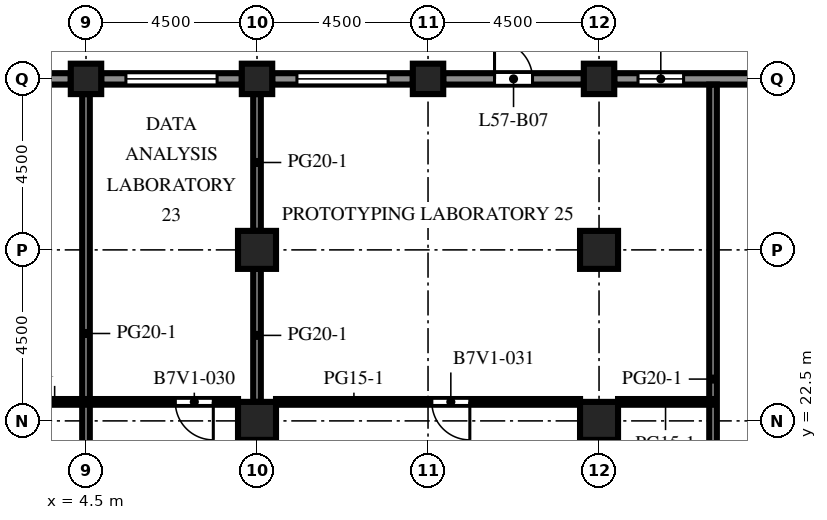
"""IFC4 building model, lengths in metres.
Left out: names, types, materials, properties, quantities, classifications, styles, units other than length and angle.
Written with IfcOpenShell. Run it as: python <this file> out.ifc"""

import sys

from ifc_helpers import new_model, si_unit, direction, frame, frame_2d, origin, origin_2d, place, context, subcontext, project, spatial, rectangle, extrude, element, fill, save


model = new_model("IFC4")
c1 = context("Model", 3, precision=1e-05, world=origin(), true_north=direction((0.0, 1.0)))
c2 = subcontext(c1, "Body", "Model", "MODEL_VIEW")
j1 = project(units=[si_unit("LENGTHUNIT", "METRE"), si_unit("PLANEANGLEUNIT", "RADIAN")], contexts=[c1])
p1 = place(None, origin())
s1 = spatial("IfcSite", under=j1, at=p1, CompositionType="ELEMENT")
p2 = place(p1, origin())
s2 = spatial("IfcBuilding", under=s1, at=p2, CompositionType="ELEMENT")
p3 = place(p2, frame((0.0, 0.0, 252.1)))
s3 = spatial("IfcBuildingStorey", under=s2, at=p3, CompositionType="ELEMENT", Elevation=252.1)
for number, where, z_axis, x_axis in (
    (1, (4.5, 31.5, 0.0), (0.0, 0.0, 1.0), (1.0, 0.0, 0.0)),
    (2, (9.0, 31.5, 0.0), (0.0, 0.0, 1.0), (1.0, 0.0, 0.0)),
    (3, (13.5, 31.5, 0.0), (0.0, 0.0, 1.0), (1.0, 0.0, 0.0)),
    (4, (18.0, 31.5, 0.0), (0.0, 0.0, 1.0), (1.0, 0.0, 0.0)),
):
    element("IfcColumn", number, at=place(p3, frame(where, z_axis=z_axis, x_axis=x_axis)), inside=s3, PredefinedType="COLUMN", context=c2, shape_type="SweptSolid", body=[
        extrude(rectangle(XDim=0.8, YDim=0.8, at=origin_2d()), origin(), (0.0, 0.0, 1.0), 4.1),
    ])
for number, where, z_axis, x_axis in (
    (5, (9.0, 22.5, 0.0), (0.0, 0.0, 1.0), (1.0, 0.0, 0.0)),
    (6, (9.0, 27.0, 0.0), (0.0, 0.0, 1.0), (1.0, 0.0, 0.0)),
    (7, (18.0, 22.5, 0.0), (0.0, 0.0, 1.0), (1.0, 0.0, 0.0)),
    (8, (18.0, 27.0, 0.0), (0.0, 0.0, 1.0), (1.0, 0.0, 0.0)),
):
    element("IfcColumn", number, at=place(p3, frame(where, z_axis=z_axis, x_axis=x_axis)), inside=s3, PredefinedType="COLUMN", context=c2, shape_type="SweptSolid", body=[
        extrude(rectangle(XDim=1.0, YDim=1.0, at=origin_2d()), origin(), (0.0, 0.0, 1.0), 4.1),
    ])
p4 = place(p3, frame((18.4, 31.5, 0.0), z_axis=(0.0, 0.0, 1.0), x_axis=(1.0, 0.0, 0.0)))
e9 = element("IfcWall", 9, at=p4, inside=s3, PredefinedType="SOLIDWALL", context=c2, shape_type="SweptSolid", body=[
    extrude(rectangle(XDim=3.7, YDim=0.3, at=frame_2d((1.85, 0.0))), origin(), (0.0, 0.0, 1.0), 2.85),
])
p5 = place(p4, frame((0.625, 0.0, 0.8)))
e10 = element("IfcOpeningElement", 10, at=p5, cuts=e9, PredefinedType="OPENING", context=c2, shape_type="SweptSolid", body=[
    extrude(rectangle(XDim=1.2, YDim=1.7, at=frame_2d((0.6, 0.85))), frame((0.0, 0.16, 0.0), z_axis=(0.0, -1.0, 0.0), x_axis=(1.0, 0.0, 0.0)), (0.0, 0.0, 1.0), 0.32),
])
p6 = place(p3, frame((13.9, 31.5, 0.0), z_axis=(0.0, 0.0, 1.0), x_axis=(1.0, 0.0, 0.0)))
e11 = element("IfcWall", 11, at=p6, inside=s3, PredefinedType="SOLIDWALL", context=c2, shape_type="SweptSolid", body=[
    extrude(rectangle(XDim=3.7, YDim=0.3, at=frame_2d((1.85, 0.0))), origin(), (0.0, 0.0, 1.0), 2.85),
])
p7 = place(p6, frame((1.35, 0.0, 0.0)))
e12 = element("IfcOpeningElement", 12, at=p7, cuts=e11, PredefinedType="OPENING", context=c2, shape_type="SweptSolid", body=[
    extrude(rectangle(XDim=1.0, YDim=2.2, at=frame_2d((0.5, 1.1))), frame((0.0, 0.16, 0.0), z_axis=(0.0, -1.0, 0.0), x_axis=(1.0, 0.0, 0.0)), (0.0, 0.0, 1.0), 0.32),
])
p8 = place(p3, frame((9.4, 31.5, 0.0), z_axis=(0.0, 0.0, 1.0), x_axis=(1.0, 0.0, 0.0)))
e13 = element("IfcWall", 13, at=p8, inside=s3, PredefinedType="SOLIDWALL", context=c2, shape_type="SweptSolid", body=[
    extrude(rectangle(XDim=3.7, YDim=0.3, at=frame_2d((1.85, 0.0))), origin(), (0.0, 0.0, 1.0), 2.85),
])
p9 = place(p8, frame((0.65, 0.0, 0.8)))
e14 = element("IfcOpeningElement", 14, at=p9, cuts=e13, PredefinedType="OPENING", context=c2, shape_type="SweptSolid", body=[
    extrude(rectangle(XDim=2.4, YDim=1.7, at=frame_2d((1.2, 0.85))), frame((0.0, 0.16, 0.0), z_axis=(0.0, -1.0, 0.0), x_axis=(1.0, 0.0, 0.0)), (0.0, 0.0, 1.0), 0.32),
])
p10 = place(p3, frame((4.9, 31.5, 0.0), z_axis=(0.0, 0.0, 1.0), x_axis=(1.0, 0.0, 0.0)))
e15 = element("IfcWall", 15, at=p10, inside=s3, PredefinedType="SOLIDWALL", context=c2, shape_type="SweptSolid", body=[
    extrude(rectangle(XDim=3.7, YDim=0.3, at=frame_2d((1.85, 0.0))), origin(), (0.0, 0.0, 1.0), 2.85),
])
p11 = place(p10, frame((0.65, 0.0, 0.8)))
e16 = element("IfcOpeningElement", 16, at=p11, cuts=e15, PredefinedType="OPENING", context=c2, shape_type="SweptSolid", body=[
    extrude(rectangle(XDim=2.4, YDim=1.7, at=frame_2d((1.2, 0.85))), frame((0.0, 0.16, 0.0), z_axis=(0.0, -1.0, 0.0), x_axis=(1.0, 0.0, 0.0)), (0.0, 0.0, 1.0), 0.32),
])
p12 = place(p3, frame((0.4, 31.5, 0.0), z_axis=(0.0, 0.0, 1.0), x_axis=(1.0, 0.0, 0.0)))
e17 = element("IfcWall", 17, at=p12, inside=s3, PredefinedType="SOLIDWALL", context=c2, shape_type="SweptSolid", body=[
    extrude(rectangle(XDim=3.7, YDim=0.3, at=frame_2d((1.85, 0.0))), origin(), (0.0, 0.0, 1.0), 2.85),
])
p13 = place(p12, frame((0.65, 0.0, 0.8)))
e18 = element("IfcOpeningElement", 18, at=p13, cuts=e17, PredefinedType="OPENING", context=c2, shape_type="SweptSolid", body=[
    extrude(rectangle(XDim=2.4, YDim=1.7, at=frame_2d((1.2, 0.85))), frame((0.0, 0.16, 0.0), z_axis=(0.0, -1.0, 0.0), x_axis=(1.0, 0.0, 0.0)), (0.0, 0.0, 1.0), 0.32),
])
p14 = place(p3, frame((4.5, 18.5, 0.0), z_axis=(0.0, 0.0, 1.0), x_axis=(0.0, 1.0, 0.0)))
e19 = element("IfcWall", 19, at=p14, inside=s3, PredefinedType="PARTITIONING", context=c2, shape_type="SweptSolid", body=[
    extrude(rectangle(XDim=12.6, YDim=0.2, at=frame_2d((6.3, 0.0))), origin(), (0.0, 0.0, 1.0), 3.65),
])
p15 = place(p3, frame((9.0, 23.0, 0.0), z_axis=(0.0, 0.0, 1.0), x_axis=(0.0, 1.0, 0.0)))
e20 = element("IfcWall", 20, at=p15, inside=s3, PredefinedType="PARTITIONING", context=c2, shape_type="SweptSolid", body=[
    extrude(rectangle(XDim=3.5, YDim=0.2, at=frame_2d((1.75, 0.0))), origin(), (0.0, 0.0, 1.0), 3.65),
])
p16 = place(p3, frame((9.0, 27.5, 0.0), z_axis=(0.0, 0.0, 1.0), x_axis=(0.0, 1.0, 0.0)))
e21 = element("IfcWall", 21, at=p16, inside=s3, PredefinedType="PARTITIONING", context=c2, shape_type="SweptSolid", body=[
    extrude(rectangle(XDim=3.6, YDim=0.2, at=frame_2d((1.8, 0.0))), origin(), (0.0, 0.0, 1.0), 3.65),
])
p17 = place(p3, frame((21.0, 31.35, 0.0), z_axis=(0.0, 0.0, 1.0), x_axis=(0.0, -1.0, 0.0)))
e22 = element("IfcWall", 22, at=p17, inside=s3, PredefinedType="PARTITIONING", context=c2, shape_type="SweptSolid", body=[
    extrude(rectangle(XDim=25.1, YDim=0.2, at=frame_2d((12.55, 0.0))), origin(), (0.0, 0.0, 1.0), 3.65),
])
p18 = place(p17, frame((15.5, 0.0, 0.0)))
e23 = element("IfcOpeningElement", 23, at=p18, cuts=e22, PredefinedType="OPENING", context=c2, shape_type="SweptSolid", body=[
    extrude(rectangle(XDim=1.0, YDim=2.1, at=frame_2d((0.5, 1.05))), frame((0.0, 0.11, 0.0), z_axis=(0.0, -1.0, 0.0), x_axis=(1.0, 0.0, 0.0)), (0.0, 0.0, 1.0), 0.22),
])
p19 = place(p3, frame((0.5, 23.0, 0.0), z_axis=(0.0, 0.0, 1.0), x_axis=(1.0, 0.0, 0.0)))
e24 = element("IfcWall", 24, at=p19, inside=s3, PredefinedType="PARTITIONING", context=c2, shape_type="SweptSolid", body=[
    extrude(rectangle(XDim=8.0, YDim=0.15, at=frame_2d((4.0, 0.0))), origin(), (0.0, 0.0, 1.0), 3.65),
])
p20 = place(p19, frame((6.35, 0.0, 0.0)))
e25 = element("IfcOpeningElement", 25, at=p20, cuts=e24, PredefinedType="OPENING", context=c2, shape_type="SweptSolid", body=[
    extrude(rectangle(XDim=1.0, YDim=2.1, at=frame_2d((0.5, 1.05))), frame((0.0, 0.085, 0.0), z_axis=(0.0, -1.0, 0.0), x_axis=(1.0, 0.0, 0.0)), (0.0, 0.0, 1.0), 0.17),
])
p21 = place(p3, frame((9.5, 23.0, 0.0), z_axis=(0.0, 0.0, 1.0), x_axis=(1.0, 0.0, 0.0)))
e26 = element("IfcWall", 26, at=p21, inside=s3, PredefinedType="PARTITIONING", context=c2, shape_type="SweptSolid", body=[
    extrude(rectangle(XDim=8.0, YDim=0.15, at=frame_2d((4.0, 0.0))), origin(), (0.0, 0.0, 1.0), 3.65),
])
p22 = place(p21, frame((4.1, 0.0, 0.0)))
e27 = element("IfcOpeningElement", 27, at=p22, cuts=e26, PredefinedType="OPENING", context=c2, shape_type="SweptSolid", body=[
    extrude(rectangle(XDim=1.0, YDim=2.1, at=frame_2d((0.5, 1.05))), frame((0.0, 0.085, 0.0), z_axis=(0.0, -1.0, 0.0), x_axis=(1.0, 0.0, 0.0)), (0.0, 0.0, 1.0), 0.17),
])
p23 = place(p3, frame((18.5, 23.0, 0.0), z_axis=(0.0, 0.0, 1.0), x_axis=(1.0, 0.0, 0.0)))
e28 = element("IfcWall", 28, at=p23, inside=s3, PredefinedType="PARTITIONING", context=c2, shape_type="SweptSolid", body=[
    extrude(rectangle(XDim=2.5, YDim=0.15, at=frame_2d((1.25, 0.0))), origin(), (0.0, 0.0, 1.0), 3.65),
])
p24 = place(p5, origin())
e29 = element("IfcWindow", 29, at=p24, inside=s3, PartitioningType="SINGLE_PANEL", PredefinedType="WINDOW", context=c2, shape_type="SweptSolid", body=[
    extrude(rectangle(XDim=1.2, YDim=1.7, at=frame_2d((0.6, 0.85))), frame((0.0, 0.03, 0.0), z_axis=(0.0, -1.0, 0.0), x_axis=(1.0, 0.0, 0.0)), (0.0, 0.0, 1.0), 0.06),
])
fill(e10, e29)
p25 = place(p7, origin())
e30 = element("IfcDoor", 30, at=p25, inside=s3, OperationType="SINGLE_SWING_LEFT", PredefinedType="DOOR", context=c2, shape_type="SweptSolid", body=[
    extrude(rectangle(XDim=1.0, YDim=2.2, at=frame_2d((0.5, 1.1))), frame((0.0, 0.025, 0.0), z_axis=(0.0, -1.0, 0.0), x_axis=(1.0, 0.0, 0.0)), (0.0, 0.0, 1.0), 0.05),
])
fill(e12, e30)
p26 = place(p9, origin())
e31 = element("IfcWindow", 31, at=p26, inside=s3, PartitioningType="SINGLE_PANEL", PredefinedType="WINDOW", context=c2, shape_type="SweptSolid", body=[
    extrude(rectangle(XDim=2.4, YDim=1.7, at=frame_2d((1.2, 0.85))), frame((0.0, 0.03, 0.0), z_axis=(0.0, -1.0, 0.0), x_axis=(1.0, 0.0, 0.0)), (0.0, 0.0, 1.0), 0.06),
])
fill(e14, e31)
p27 = place(p11, origin())
e32 = element("IfcWindow", 32, at=p27, inside=s3, PartitioningType="SINGLE_PANEL", PredefinedType="WINDOW", context=c2, shape_type="SweptSolid", body=[
    extrude(rectangle(XDim=2.4, YDim=1.7, at=frame_2d((1.2, 0.85))), frame((0.0, 0.03, 0.0), z_axis=(0.0, -1.0, 0.0), x_axis=(1.0, 0.0, 0.0)), (0.0, 0.0, 1.0), 0.06),
])
fill(e16, e32)
p28 = place(p20, origin())
e33 = element("IfcDoor", 33, at=p28, inside=s3, OperationType="SINGLE_SWING_RIGHT", PredefinedType="DOOR", context=c2, shape_type="SweptSolid", body=[
    extrude(rectangle(XDim=1.0, YDim=2.1, at=frame_2d((0.5, 1.05))), frame((0.0, 0.025, 0.0), z_axis=(0.0, -1.0, 0.0), x_axis=(1.0, 0.0, 0.0)), (0.0, 0.0, 1.0), 0.05),
])
fill(e25, e33)
p29 = place(p22, origin())
e34 = element("IfcDoor", 34, at=p29, inside=s3, OperationType="SINGLE_SWING_RIGHT", PredefinedType="DOOR", context=c2, shape_type="SweptSolid", body=[
    extrude(rectangle(XDim=1.0, YDim=2.1, at=frame_2d((0.5, 1.05))), frame((0.0, 0.025, 0.0), z_axis=(0.0, -1.0, 0.0), x_axis=(1.0, 0.0, 0.0)), (0.0, 0.0, 1.0), 0.05),
])
fill(e27, e34)
save(model, sys.argv[1])
